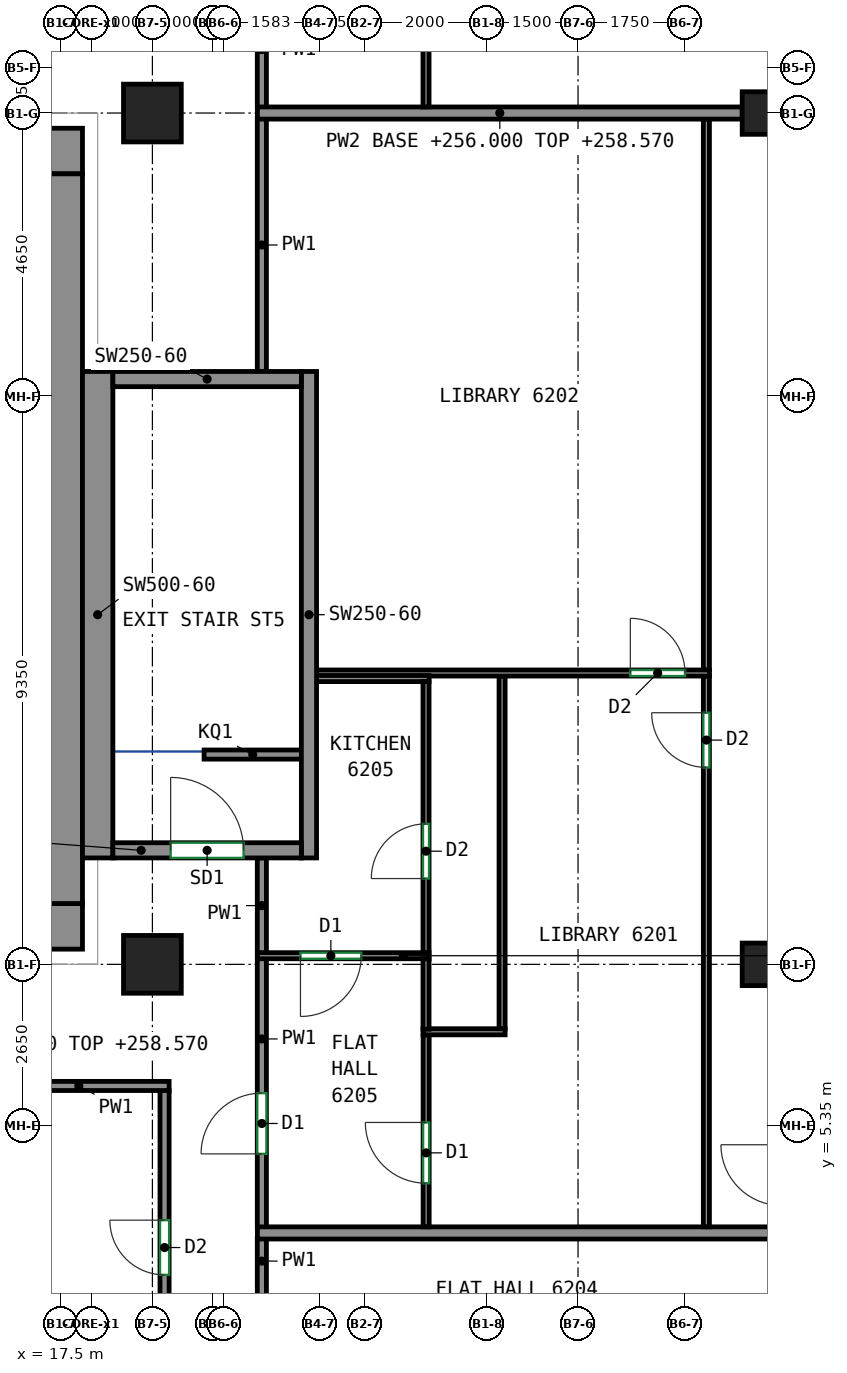
"""IFC4 building model, lengths in metres.
Left out: names, types, materials, properties, quantities, classifications, styles, units other than length and angle.
Written with IfcOpenShell. Run it as: python <this file> out.ifc"""

import sys

from ifc_helpers import new_model, si_unit, direction, frame, frame_2d, origin, origin_2d, place, context, subcontext, project, spatial, rectangle, extrude, source, transform, mapped, element, fill, save


model = new_model("IFC4")
c1 = context("Model", 3, precision=1e-05, world=origin(), true_north=direction((0.0, 1.0)))
c2 = subcontext(c1, "Body", "Model", "MODEL_VIEW")
j1 = project(units=[si_unit("LENGTHUNIT", "METRE"), si_unit("PLANEANGLEUNIT", "RADIAN")], contexts=[c1])
p1 = place(None, origin())
s1 = spatial("IfcSite", under=j1, at=p1, CompositionType="ELEMENT")
p2 = place(p1, origin())
s2 = spatial("IfcBuilding", under=s1, at=p2, CompositionType="ELEMENT")
p3 = place(p2, frame((0.0, 0.0, 256.0)))
s3 = spatial("IfcBuildingStorey", under=s2, at=p3, CompositionType="ELEMENT", Elevation=256.0)
m1 = source(origin(), c2, "Body", "SweptSolid", [
    extrude(rectangle(XDim=0.95, YDim=0.95, at=origin_2d()), origin(), (0.0, 0.0, 1.0), 3.12),
])
for number, where, z_axis, x_axis in (
    (1, (19.0, 8.0, 0.0), (0.0, 0.0, 1.0), (1.0, 0.0, 0.0)),
    (2, (19.0, 22.0, 0.0), (0.0, 0.0, 1.0), (1.0, 0.0, 0.0)),
):
    element("IfcColumn", number, at=place(p3, frame(where, z_axis=z_axis, x_axis=x_axis)), inside=s3, PredefinedType="COLUMN", context=c2, shape_type="MappedRepresentation", body=[
        mapped(m1, transform((0.0, 0.0, 0.0))),
    ])
m2 = source(origin(), c2, "Body", "SweptSolid", [
    extrude(rectangle(XDim=0.7, YDim=0.7, at=origin_2d()), origin(), (0.0, 0.0, 1.0), 3.12),
])
for number, where, z_axis, x_axis in (
    (3, (29.05, 8.0, 0.0), (0.0, 0.0, 1.0), (1.0, 0.0, 0.0)),
    (4, (29.05, 22.0, 0.0), (0.0, 0.0, 1.0), (1.0, 0.0, 0.0)),
):
    element("IfcColumn", number, at=place(p3, frame(where, z_axis=z_axis, x_axis=x_axis)), inside=s3, PredefinedType="COLUMN", context=c2, shape_type="MappedRepresentation", body=[
        mapped(m2, transform((0.0, 0.0, 0.0))),
    ])
m3 = source(origin(), c2, "Body", "SweptSolid", [
    extrude(rectangle(XDim=5.38, YDim=0.75, at=frame_2d((2.69, 0.0))), origin(), (0.0, 0.0, 1.0), 3.12),
])
p4 = place(p3, frame((12.47, 8.625, 0.0), z_axis=(0.0, 0.0, 1.0), x_axis=(1.0, 0.0, 0.0)))
e5 = element("IfcWall", 5, at=p4, inside=s3, PredefinedType="SHEAR", context=c2, shape_type="MappedRepresentation", body=[
    mapped(m3, transform((0.0, 0.0, 0.0))),
])
p5 = place(p4, frame((2.18, 0.0, 0.0)))
e6 = element("IfcOpeningElement", 6, at=p5, cuts=e5, PredefinedType="OPENING", context=c2, shape_type="SweptSolid", body=[
    extrude(rectangle(XDim=1.2, YDim=2.1, at=frame_2d((0.6, 1.05))), frame((0.0, 0.385, 0.0), z_axis=(0.0, -1.0, 0.0), x_axis=(1.0, 0.0, 0.0)), (0.0, 0.0, 1.0), 0.77),
])
m4 = source(origin(), c2, "Body", "SweptSolid", [
    extrude(rectangle(XDim=33.6, YDim=0.75, at=frame_2d((16.8, 0.0))), origin(), (0.0, 0.0, 1.0), 3.12),
])
p6 = place(p3, frame((-15.75, 21.375, 0.0), z_axis=(0.0, 0.0, 1.0), x_axis=(1.0, 0.0, 0.0)))
e7 = element("IfcWall", 7, at=p6, inside=s3, PredefinedType="SHEAR", context=c2, shape_type="MappedRepresentation", body=[
    mapped(m4, transform((0.0, 0.0, 0.0))),
])
p7 = place(p6, frame((5.858, 0.0, 0.0)))
e8 = element("IfcOpeningElement", 8, at=p7, cuts=e7, PredefinedType="OPENING", context=c2, shape_type="SweptSolid", body=[
    extrude(rectangle(XDim=0.9, YDim=2.1, at=frame_2d((0.45, 1.05))), frame((0.0, 0.385, 0.0), z_axis=(0.0, -1.0, 0.0), x_axis=(1.0, 0.0, 0.0)), (0.0, 0.0, 1.0), 0.77),
])
p8 = place(p6, frame((10.923, 0.0, 0.0)))
e9 = element("IfcOpeningElement", 9, at=p8, cuts=e7, PredefinedType="OPENING", context=c2, shape_type="SweptSolid", body=[
    extrude(rectangle(XDim=0.9, YDim=2.1, at=frame_2d((0.45, 1.05))), frame((0.0, 0.385, 0.0), z_axis=(0.0, -1.0, 0.0), x_axis=(1.0, 0.0, 0.0)), (0.0, 0.0, 1.0), 0.77),
])
p9 = place(p6, frame((15.988, 0.0, 0.0)))
e10 = element("IfcOpeningElement", 10, at=p9, cuts=e7, PredefinedType="OPENING", context=c2, shape_type="SweptSolid", body=[
    extrude(rectangle(XDim=0.9, YDim=2.1, at=frame_2d((0.45, 1.05))), frame((0.0, 0.385, 0.0), z_axis=(0.0, -1.0, 0.0), x_axis=(1.0, 0.0, 0.0)), (0.0, 0.0, 1.0), 0.77),
])
p10 = place(p6, frame((21.643, 0.0, 0.0)))
e11 = element("IfcOpeningElement", 11, at=p10, cuts=e7, PredefinedType="OPENING", context=c2, shape_type="SweptSolid", body=[
    extrude(rectangle(XDim=0.9, YDim=2.1, at=frame_2d((0.45, 1.05))), frame((0.0, 0.385, 0.0), z_axis=(0.0, -1.0, 0.0), x_axis=(1.0, 0.0, 0.0)), (0.0, 0.0, 1.0), 0.77),
])
p11 = place(p6, frame((27.07, 0.0, 0.0)))
e12 = element("IfcOpeningElement", 12, at=p11, cuts=e7, PredefinedType="OPENING", context=c2, shape_type="SweptSolid", body=[
    extrude(rectangle(XDim=0.9, YDim=2.1, at=frame_2d((0.45, 1.05))), frame((0.0, 0.385, 0.0), z_axis=(0.0, -1.0, 0.0), x_axis=(1.0, 0.0, 0.0)), (0.0, 0.0, 1.0), 0.77),
])
p12 = place(p6, frame((2.275, 0.0, 0.0)))
e13 = element("IfcOpeningElement", 13, at=p12, cuts=e7, PredefinedType="OPENING", context=c2, shape_type="SweptSolid", body=[
    extrude(rectangle(XDim=0.9, YDim=2.1, at=frame_2d((0.45, 1.05))), frame((0.0, 0.385, 0.0), z_axis=(0.0, -1.0, 0.0), x_axis=(1.0, 0.0, 0.0)), (0.0, 0.0, 1.0), 0.77),
])
p13 = place(p6, frame((30.425, 0.0, 0.0)))
e14 = element("IfcOpeningElement", 14, at=p13, cuts=e7, PredefinedType="OPENING", context=c2, shape_type="SweptSolid", body=[
    extrude(rectangle(XDim=0.9, YDim=2.1, at=frame_2d((0.45, 1.05))), frame((0.0, 0.385, 0.0), z_axis=(0.0, -1.0, 0.0), x_axis=(1.0, 0.0, 0.0)), (0.0, 0.0, 1.0), 0.77),
])
m5 = source(origin(), c2, "Body", "SweptSolid", [
    extrude(rectangle(XDim=12.0, YDim=0.75, at=frame_2d((6.0, 0.0))), origin(), (0.0, 0.0, 1.0), 3.12),
])
p14 = place(p3, frame((17.475, 9.0, 0.0), z_axis=(0.0, 0.0, 1.0), x_axis=(0.0, 1.0, 0.0)))
e15 = element("IfcWall", 15, at=p14, inside=s3, PredefinedType="SHEAR", context=c2, shape_type="MappedRepresentation", body=[
    mapped(m5, transform((0.0, 0.0, 0.0))),
])
m6 = source(origin(), c2, "Body", "SweptSolid", [
    extrude(rectangle(XDim=8.0, YDim=0.5, at=frame_2d((4.0, 0.0))), origin(), (0.0, 0.0, 1.0), 3.12),
])
p15 = place(p3, frame((18.1, 9.75, 0.0), z_axis=(0.0, 0.0, 1.0), x_axis=(0.0, 1.0, 0.0)))
e16 = element("IfcWall", 16, at=p15, inside=s3, PredefinedType="SHEAR", context=c2, shape_type="MappedRepresentation", body=[
    mapped(m6, transform((0.0, 0.0, 0.0))),
])
m7 = source(origin(), c2, "Body", "SweptSolid", [
    extrude(rectangle(XDim=8.0, YDim=0.25, at=frame_2d((4.0, 0.0))), origin(), (0.0, 0.0, 1.0), 3.12),
])
p16 = place(p3, frame((21.575, 9.75, 0.0), z_axis=(0.0, 0.0, 1.0), x_axis=(0.0, 1.0, 0.0)))
e17 = element("IfcWall", 17, at=p16, inside=s3, PredefinedType="SHEAR", context=c2, shape_type="MappedRepresentation", body=[
    mapped(m7, transform((0.0, 0.0, 0.0))),
])
m8 = source(origin(), c2, "Body", "SweptSolid", [
    extrude(rectangle(XDim=3.1, YDim=0.25, at=frame_2d((1.55, 0.0))), origin(), (0.0, 0.0, 1.0), 3.12),
])
p17 = place(p3, frame((18.35, 9.875, 0.0), z_axis=(0.0, 0.0, 1.0), x_axis=(1.0, 0.0, 0.0)))
e18 = element("IfcWall", 18, at=p17, inside=s3, PredefinedType="SHEAR", context=c2, shape_type="MappedRepresentation", body=[
    mapped(m8, transform((0.0, 0.0, 0.0))),
])
p18 = place(p17, frame((0.95, 0.0, 0.0)))
e19 = element("IfcOpeningElement", 19, at=p18, cuts=e18, PredefinedType="OPENING", context=c2, shape_type="SweptSolid", body=[
    extrude(rectangle(XDim=1.2, YDim=2.1, at=frame_2d((0.6, 1.05))), frame((0.0, 0.135, 0.0), z_axis=(0.0, -1.0, 0.0), x_axis=(1.0, 0.0, 0.0)), (0.0, 0.0, 1.0), 0.27),
])
p19 = place(p3, frame((18.35, 17.625, 0.0), z_axis=(0.0, 0.0, 1.0), x_axis=(1.0, 0.0, 0.0)))
e20 = element("IfcWall", 20, at=p19, inside=s3, PredefinedType="SHEAR", context=c2, shape_type="MappedRepresentation", body=[
    mapped(m8, transform((0.0, 0.0, 0.0))),
])
m9 = source(origin(), c2, "Body", "SweptSolid", [
    extrude(rectangle(XDim=1.6, YDim=0.15, at=frame_2d((0.8, 0.0))), origin(), (0.0, 0.0, 1.0), 1.1),
])
p20 = place(p3, frame((21.45, 11.45, 0.0), z_axis=(0.0, 0.0, 1.0), x_axis=(-1.0, 0.0, 0.0)))
e21 = element("IfcWall", 21, at=p20, inside=s3, PredefinedType="PARAPET", context=c2, shape_type="MappedRepresentation", body=[
    mapped(m9, transform((0.0, 0.0, 0.0))),
])
p21 = place(p3, frame((20.8, 1.007, 0.0), z_axis=(0.0, 0.0, 1.0), x_axis=(0.0, 1.0, 0.0)))
e22 = element("IfcWall", 22, at=p21, inside=s3, PredefinedType="PARTITIONING", context=c2, shape_type="SweptSolid", body=[
    extrude(rectangle(XDim=2.486, YDim=0.15, at=frame_2d((1.243, 0.0))), origin(), (0.0, 0.0, 1.0), 3.12),
])
p22 = place(p21, frame((0.309, 0.0, 0.0)))
e23 = element("IfcOpeningElement", 23, at=p22, cuts=e22, PredefinedType="OPENING", context=c2, shape_type="SweptSolid", body=[
    extrude(rectangle(XDim=1.0, YDim=2.1, at=frame_2d((0.5, 1.05))), frame((0.0, 0.085, 0.0), z_axis=(0.0, -1.0, 0.0), x_axis=(1.0, 0.0, 0.0)), (0.0, 0.0, 1.0), 0.17),
])
p23 = place(p3, frame((20.8, 17.75, 0.0), z_axis=(0.0, 0.0, 1.0), x_axis=(0.0, 1.0, 0.0)))
e24 = element("IfcWall", 24, at=p23, inside=s3, PredefinedType="PARTITIONING", context=c2, shape_type="SweptSolid", body=[
    extrude(rectangle(XDim=4.16, YDim=0.15, at=frame_2d((2.08, 0.0))), origin(), (0.0, 0.0, 1.0), 3.12),
])
p24 = place(p3, frame((20.8, 3.673, 0.0), z_axis=(0.0, 0.0, 1.0), x_axis=(0.0, 1.0, 0.0)))
e25 = element("IfcWall", 25, at=p24, inside=s3, PredefinedType="PARTITIONING", context=c2, shape_type="SweptSolid", body=[
    extrude(rectangle(XDim=4.429, YDim=0.15, at=frame_2d((2.214, 0.0))), origin(), (0.0, 0.0, 1.0), 3.12),
])
p25 = place(p24, frame((1.21, 0.0, 0.0)))
e26 = element("IfcOpeningElement", 26, at=p25, cuts=e25, PredefinedType="OPENING", context=c2, shape_type="SweptSolid", body=[
    extrude(rectangle(XDim=1.0, YDim=2.1, at=frame_2d((0.5, 1.05))), frame((0.0, 0.085, 0.0), z_axis=(0.0, -1.0, 0.0), x_axis=(1.0, 0.0, 0.0)), (0.0, 0.0, 1.0), 0.17),
])
p26 = place(p3, frame((20.8, 8.182, 0.0), z_axis=(0.0, 0.0, 1.0), x_axis=(0.0, 1.0, 0.0)))
e27 = element("IfcWall", 27, at=p26, inside=s3, PredefinedType="PARTITIONING", context=c2, shape_type="SweptSolid", body=[
    extrude(rectangle(XDim=1.568, YDim=0.15, at=frame_2d((0.784, 0.0))), origin(), (0.0, 0.0, 1.0), 3.12),
])
p27 = place(p3, frame((20.8, 22.09, 0.0), z_axis=(0.0, 0.0, 1.0), x_axis=(0.0, 1.0, 0.0)))
e28 = element("IfcWall", 28, at=p27, inside=s3, PredefinedType="PARTITIONING", context=c2, shape_type="SweptSolid", body=[
    extrude(rectangle(XDim=1.908, YDim=0.15, at=frame_2d((0.954, 0.0))), origin(), (0.0, 0.0, 1.0), 3.12),
])
p28 = place(p3, frame((19.2, -0.358, 0.0), z_axis=(0.0, 0.0, 1.0), x_axis=(0.0, 1.0, 0.0)))
e29 = element("IfcWall", 29, at=p28, inside=s3, PredefinedType="PARTITIONING", context=c2, shape_type="SweptSolid", body=[
    extrude(rectangle(XDim=6.283, YDim=0.15, at=frame_2d((3.142, 0.0))), origin(), (0.0, 0.0, 1.0), 2.57),
])
p29 = place(p28, frame((3.251, 0.0, 0.0)))
e30 = element("IfcOpeningElement", 30, at=p29, cuts=e29, PredefinedType="OPENING", context=c2, shape_type="SweptSolid", body=[
    extrude(rectangle(XDim=0.9, YDim=2.1, at=frame_2d((0.45, 1.05))), frame((0.0, 0.085, 0.0), z_axis=(0.0, -1.0, 0.0), x_axis=(1.0, 0.0, 0.0)), (0.0, 0.0, 1.0), 0.17),
])
p30 = place(p3, frame((16.305, 6.0, 0.0), z_axis=(0.0, 0.0, 1.0), x_axis=(1.0, 0.0, 0.0)))
e31 = element("IfcWall", 31, at=p30, inside=s3, PredefinedType="PARTITIONING", context=c2, shape_type="SweptSolid", body=[
    extrude(rectangle(XDim=2.97, YDim=0.15, at=frame_2d((1.485, 0.0))), origin(), (0.0, 0.0, 1.0), 3.12),
])
p31 = place(p3, frame((20.727, 3.583, 0.0), z_axis=(0.0, 0.0, 1.0), x_axis=(1.0, 0.0, 0.0)))
e32 = element("IfcWall", 32, at=p31, inside=s3, PredefinedType="PARTITIONING", context=c2, shape_type="SweptSolid", body=[
    extrude(rectangle(XDim=8.523, YDim=0.2, at=frame_2d((4.261, 0.0))), origin(), (0.0, 0.0, 1.0), 3.12),
])
p32 = place(p3, frame((23.502, 3.683, 0.0), z_axis=(0.0, 0.0, 1.0), x_axis=(0.0, 1.0, 0.0)))
e33 = element("IfcWall", 33, at=p32, inside=s3, PredefinedType="PARTITIONING", context=c2, shape_type="SweptSolid", body=[
    extrude(rectangle(XDim=3.158, YDim=0.1, at=frame_2d((1.579, 0.0))), origin(), (0.0, 0.0, 1.0), 3.12),
])
p33 = place(p32, frame((0.717, 0.0, 0.0)))
e34 = element("IfcOpeningElement", 34, at=p33, cuts=e33, PredefinedType="OPENING", context=c2, shape_type="SweptSolid", body=[
    extrude(rectangle(XDim=1.0, YDim=2.1, at=frame_2d((0.5, 1.05))), frame((0.0, 0.06, 0.0), z_axis=(0.0, -1.0, 0.0), x_axis=(1.0, 0.0, 0.0)), (0.0, 0.0, 1.0), 0.12),
])
p34 = place(p3, frame((28.111, 3.683, 0.0), z_axis=(0.0, 0.0, 1.0), x_axis=(0.0, 1.0, 0.0)))
e35 = element("IfcWall", 35, at=p34, inside=s3, PredefinedType="PARTITIONING", context=c2, shape_type="SweptSolid", body=[
    extrude(rectangle(XDim=9.058, YDim=0.1, at=frame_2d((4.529, 0.0))), origin(), (0.0, 0.0, 1.0), 3.12),
])
p35 = place(p34, frame((7.555, 0.0, 0.0)))
e36 = element("IfcOpeningElement", 36, at=p35, cuts=e35, PredefinedType="OPENING", context=c2, shape_type="SweptSolid", body=[
    extrude(rectangle(XDim=0.9, YDim=2.1, at=frame_2d((0.45, 1.05))), frame((0.0, 0.06, 0.0), z_axis=(0.0, -1.0, 0.0), x_axis=(1.0, 0.0, 0.0)), (0.0, 0.0, 1.0), 0.12),
])
p36 = place(p3, frame((24.801, 6.891, 0.0), z_axis=(0.0, 0.0, 1.0), x_axis=(-1.0, 0.0, 0.0)))
e37 = element("IfcWall", 37, at=p36, inside=s3, PredefinedType="PARTITIONING", context=c2, shape_type="SweptSolid", body=[
    extrude(rectangle(XDim=1.349, YDim=0.1, at=frame_2d((0.675, 0.0))), origin(), (0.0, 0.0, 1.0), 3.12),
])
p37 = place(p3, frame((24.751, 12.741, 0.0), z_axis=(0.0, 0.0, 1.0), x_axis=(0.0, -1.0, 0.0)))
e38 = element("IfcWall", 38, at=p37, inside=s3, PredefinedType="PARTITIONING", context=c2, shape_type="SweptSolid", body=[
    extrude(rectangle(XDim=5.8, YDim=0.1, at=frame_2d((2.9, 0.0))), origin(), (0.0, 0.0, 1.0), 3.12),
])
p38 = place(p3, frame((28.111, 12.841, 0.0), z_axis=(0.0, 0.0, 1.0), x_axis=(0.0, 1.0, 0.0)))
e39 = element("IfcWall", 39, at=p38, inside=s3, PredefinedType="PARTITIONING", context=c2, shape_type="SweptSolid", body=[
    extrude(rectangle(XDim=9.059, YDim=0.1, at=frame_2d((4.529, 0.0))), origin(), (0.0, 0.0, 1.0), 3.12),
])
p39 = place(p3, frame((20.727, 22.0, 0.0), z_axis=(0.0, 0.0, 1.0), x_axis=(1.0, 0.0, 0.0)))
e40 = element("IfcWall", 40, at=p39, inside=s3, PredefinedType="PARTITIONING", context=c2, shape_type="SweptSolid", body=[
    extrude(rectangle(XDim=7.973, YDim=0.2, at=frame_2d((3.986, 0.0))), origin(), (0.0, 0.0, 1.0), 2.57),
])
p40 = place(p3, frame((21.7, 12.791, 0.0), z_axis=(0.0, 0.0, 1.0), x_axis=(1.0, 0.0, 0.0)))
e41 = element("IfcWall", 41, at=p40, inside=s3, PredefinedType="PARTITIONING", context=c2, shape_type="SweptSolid", body=[
    extrude(rectangle(XDim=6.461, YDim=0.1, at=frame_2d((3.23, 0.0))), origin(), (0.0, 0.0, 1.0), 3.12),
])
p41 = place(p40, frame((5.16, 0.0, 0.0)))
e42 = element("IfcOpeningElement", 42, at=p41, cuts=e41, PredefinedType="OPENING", context=c2, shape_type="SweptSolid", body=[
    extrude(rectangle(XDim=0.9, YDim=2.1, at=frame_2d((0.45, 1.05))), frame((0.0, 0.06, 0.0), z_axis=(0.0, -1.0, 0.0), x_axis=(1.0, 0.0, 0.0)), (0.0, 0.0, 1.0), 0.12),
])
p42 = place(p3, frame((23.55, 8.142, 0.0), z_axis=(0.0, 0.0, 1.0), x_axis=(-1.0, 0.0, 0.0)))
e43 = element("IfcWall", 43, at=p42, inside=s3, PredefinedType="PARTITIONING", context=c2, shape_type="SweptSolid", body=[
    extrude(rectangle(XDim=2.823, YDim=0.1, at=frame_2d((1.412, 0.0))), origin(), (0.0, 0.0, 1.0), 2.57),
])
p43 = place(p42, frame((1.115, 0.0, 0.0)))
e44 = element("IfcOpeningElement", 44, at=p43, cuts=e43, PredefinedType="OPENING", context=c2, shape_type="SweptSolid", body=[
    extrude(rectangle(XDim=1.0, YDim=2.1, at=frame_2d((0.5, 1.05))), frame((0.0, 0.06, 0.0), z_axis=(0.0, -1.0, 0.0), x_axis=(1.0, 0.0, 0.0)), (0.0, 0.0, 1.0), 0.12),
])
p44 = place(p3, frame((23.5, 6.932, 0.0), z_axis=(0.0, 0.0, 1.0), x_axis=(0.0, 1.0, 0.0)))
e45 = element("IfcWall", 45, at=p44, inside=s3, PredefinedType="PARTITIONING", context=c2, shape_type="SweptSolid", body=[
    extrude(rectangle(XDim=1.16, YDim=0.1, at=frame_2d((0.58, 0.0))), origin(), (0.0, 0.0, 1.0), 3.12),
])
p45 = place(p3, frame((23.55, 12.7, 0.0), z_axis=(0.0, 0.0, 1.0), x_axis=(-1.0, 0.0, 0.0)))
e46 = element("IfcWall", 46, at=p45, inside=s3, PredefinedType="PARTITIONING", context=c2, shape_type="SweptSolid", body=[
    extrude(rectangle(XDim=1.85, YDim=0.1, at=frame_2d((0.925, 0.0))), origin(), (0.0, 0.0, 1.0), 3.12),
])
p46 = place(p3, frame((23.5, 8.192, 0.0), z_axis=(0.0, 0.0, 1.0), x_axis=(0.0, 1.0, 0.0)))
e47 = element("IfcWall", 47, at=p46, inside=s3, PredefinedType="PARTITIONING", context=c2, shape_type="SweptSolid", body=[
    extrude(rectangle(XDim=4.458, YDim=0.1, at=frame_2d((2.229, 0.0))), origin(), (0.0, 0.0, 1.0), 3.12),
])
p47 = place(p46, frame((1.219, 0.0, 0.0)))
e48 = element("IfcOpeningElement", 48, at=p47, cuts=e47, PredefinedType="OPENING", context=c2, shape_type="SweptSolid", body=[
    extrude(rectangle(XDim=0.9, YDim=2.1, at=frame_2d((0.45, 1.05))), frame((0.0, 0.06, 0.0), z_axis=(0.0, -1.0, 0.0), x_axis=(1.0, 0.0, 0.0)), (0.0, 0.0, 1.0), 0.12),
])
p48 = place(p3, frame((23.5, 22.1, 0.0), z_axis=(0.0, 0.0, 1.0), x_axis=(0.0, 1.0, 0.0)))
e49 = element("IfcWall", 49, at=p48, inside=s3, PredefinedType="PARTITIONING", context=c2, shape_type="SweptSolid", body=[
    extrude(rectangle(XDim=4.598, YDim=0.1, at=frame_2d((2.299, 0.0))), origin(), (0.0, 0.0, 1.0), 3.12),
])
p49 = place(p18, origin())
e50 = element("IfcDoor", 50, at=p49, inside=s3, OperationType="DOUBLE_DOOR_SINGLE_SWING", PredefinedType="DOOR", context=c2, shape_type="SweptSolid", body=[
    extrude(rectangle(XDim=1.2, YDim=2.1, at=frame_2d((0.6, 1.05))), frame((0.0, 0.025, 0.0), z_axis=(0.0, -1.0, 0.0), x_axis=(1.0, 0.0, 0.0)), (0.0, 0.0, 1.0), 0.05),
])
fill(e19, e50)
p50 = place(p29, origin())
e51 = element("IfcDoor", 51, at=p50, inside=s3, OperationType="SINGLE_SWING_RIGHT", PredefinedType="DOOR", context=c2, shape_type="SweptSolid", body=[
    extrude(rectangle(XDim=0.9, YDim=2.1, at=frame_2d((0.45, 1.05))), frame((0.0, 0.025, 0.0), z_axis=(0.0, -1.0, 0.0), x_axis=(1.0, 0.0, 0.0)), (0.0, 0.0, 1.0), 0.05),
])
fill(e30, e51)
p51 = place(p33, origin())
e52 = element("IfcDoor", 52, at=p51, inside=s3, OperationType="SINGLE_SWING_RIGHT", PredefinedType="DOOR", context=c2, shape_type="SweptSolid", body=[
    extrude(rectangle(XDim=1.0, YDim=2.1, at=frame_2d((0.5, 1.05))), frame((0.0, 0.025, 0.0), z_axis=(0.0, -1.0, 0.0), x_axis=(1.0, 0.0, 0.0)), (0.0, 0.0, 1.0), 0.05),
])
fill(e34, e52)
p52 = place(p25, origin())
e53 = element("IfcDoor", 53, at=p52, inside=s3, OperationType="SINGLE_SWING_LEFT", PredefinedType="DOOR", context=c2, shape_type="SweptSolid", body=[
    extrude(rectangle(XDim=1.0, YDim=2.1, at=frame_2d((0.5, 1.05))), frame((0.0, 0.025, 0.0), z_axis=(0.0, -1.0, 0.0), x_axis=(1.0, 0.0, 0.0)), (0.0, 0.0, 1.0), 0.05),
])
fill(e26, e53)
p53 = place(p43, origin())
e54 = element("IfcDoor", 54, at=p53, inside=s3, OperationType="SINGLE_SWING_RIGHT", PredefinedType="DOOR", context=c2, shape_type="SweptSolid", body=[
    extrude(rectangle(XDim=1.0, YDim=2.1, at=frame_2d((0.5, 1.05))), frame((0.0, 0.025, 0.0), z_axis=(0.0, -1.0, 0.0), x_axis=(1.0, 0.0, 0.0)), (0.0, 0.0, 1.0), 0.05),
])
fill(e44, e54)
p54 = place(p47, origin())
e55 = element("IfcDoor", 55, at=p54, inside=s3, OperationType="SINGLE_SWING_LEFT", PredefinedType="DOOR", context=c2, shape_type="SweptSolid", body=[
    extrude(rectangle(XDim=0.9, YDim=2.1, at=frame_2d((0.45, 1.05))), frame((0.0, 0.025, 0.0), z_axis=(0.0, -1.0, 0.0), x_axis=(1.0, 0.0, 0.0)), (0.0, 0.0, 1.0), 0.05),
])
fill(e48, e55)
p55 = place(p35, origin())
e56 = element("IfcDoor", 56, at=p55, inside=s3, OperationType="SINGLE_SWING_RIGHT", PredefinedType="DOOR", context=c2, shape_type="SweptSolid", body=[
    extrude(rectangle(XDim=0.9, YDim=2.1, at=frame_2d((0.45, 1.05))), frame((0.0, 0.025, 0.0), z_axis=(0.0, -1.0, 0.0), x_axis=(1.0, 0.0, 0.0)), (0.0, 0.0, 1.0), 0.05),
])
fill(e36, e56)
p56 = place(p41, origin())
e57 = element("IfcDoor", 57, at=p56, inside=s3, OperationType="SINGLE_SWING_LEFT", PredefinedType="DOOR", context=c2, shape_type="SweptSolid", body=[
    extrude(rectangle(XDim=0.9, YDim=2.1, at=frame_2d((0.45, 1.05))), frame((0.0, 0.025, 0.0), z_axis=(0.0, -1.0, 0.0), x_axis=(1.0, 0.0, 0.0)), (0.0, 0.0, 1.0), 0.05),
])
fill(e42, e57)
save(model, sys.argv[1])
